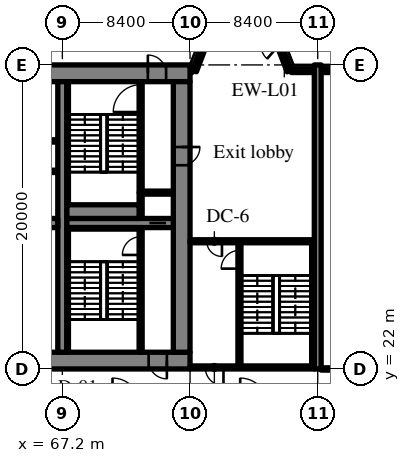
"""IFC4 building model, lengths in metres.
Left out: names, types, materials, properties, quantities, classifications, styles, units other than length and angle.
Written with IfcOpenShell. Run it as: python <this file> out.ifc"""

import sys

from ifc_helpers import new_model, si_unit, direction, frame, frame_2d, origin, place, context, subcontext, project, spatial, rectangle, extrude, source, transform, mapped, element, fill, save


model = new_model("IFC4")
c1 = context("Model", 3, precision=1e-05, world=origin(), true_north=direction((0.0, 1.0)))
c2 = subcontext(c1, "Body", "Model", "MODEL_VIEW")
j1 = project(units=[si_unit("LENGTHUNIT", "METRE"), si_unit("PLANEANGLEUNIT", "RADIAN")], contexts=[c1])
p1 = place(None, origin())
s1 = spatial("IfcSite", under=j1, at=p1, CompositionType="ELEMENT")
p2 = place(p1, origin())
s2 = spatial("IfcBuilding", under=s1, at=p2, CompositionType="ELEMENT")
p3 = place(p2, origin())
s3 = spatial("IfcBuildingStorey", under=s2, at=p3, CompositionType="ELEMENT", Elevation=0.0)
m1 = source(origin(), c2, "Body", "SweptSolid", [
    extrude(rectangle(XDim=50.4, YDim=1.1, at=frame_2d((25.2, 0.0))), origin(), (0.0, 0.0, 1.0), 5.72),
])
p4 = place(p3, frame((25.2, 22.55, 0.0), z_axis=(0.0, 0.0, 1.0), x_axis=(1.0, 0.0, 0.0)))
e1 = element("IfcWall", 1, at=p4, inside=s3, PredefinedType="SHEAR", context=c2, shape_type="MappedRepresentation", body=[
    mapped(m1, transform((0.0, 0.0, 0.0), scale=1.0)),
])
m2 = source(origin(), c2, "Body", "SweptSolid", [
    extrude(rectangle(XDim=1.8, YDim=2.1, at=frame_2d((0.9, 1.05))), frame((0.0, 0.56, 0.0), z_axis=(0.0, -1.0, 0.0), x_axis=(1.0, 0.0, 0.0)), (0.0, 0.0, 1.0), 1.12),
])
p5 = place(p4, frame((15.9, 0.0, 0.0)))
e2 = element("IfcOpeningElement", 2, at=p5, cuts=e1, PredefinedType="OPENING", context=c2, shape_type="MappedRepresentation", body=[
    mapped(m2, transform((0.0, 0.0, 0.0), scale=1.0)),
])
p6 = place(p4, frame((32.7, 0.0, 0.0)))
e3 = element("IfcOpeningElement", 3, at=p6, cuts=e1, PredefinedType="OPENING", context=c2, shape_type="MappedRepresentation", body=[
    mapped(m2, transform((0.0, 0.0, 0.0), scale=1.0)),
])
m3 = source(origin(), c2, "Body", "SweptSolid", [
    extrude(rectangle(XDim=0.9, YDim=2.1, at=frame_2d((0.45, 1.05))), frame((0.0, 0.56, 0.0), z_axis=(0.0, -1.0, 0.0), x_axis=(1.0, 0.0, 0.0)), (0.0, 0.0, 1.0), 1.12),
])
p7 = place(p4, frame((39.75, 0.0, 0.0)))
e4 = element("IfcOpeningElement", 4, at=p7, cuts=e1, PredefinedType="OPENING", context=c2, shape_type="MappedRepresentation", body=[
    mapped(m3, transform((0.0, 0.0, 0.0), scale=1.0)),
])
p8 = place(p4, frame((28.05, 0.0, 0.0)))
e5 = element("IfcOpeningElement", 5, at=p8, cuts=e1, PredefinedType="OPENING", context=c2, shape_type="MappedRepresentation", body=[
    mapped(m3, transform((0.0, 0.0, 0.0), scale=1.0)),
])
m4 = source(origin(), c2, "Body", "SweptSolid", [
    extrude(rectangle(XDim=1.2, YDim=2.1, at=frame_2d((0.6, 1.05))), frame((0.0, 0.56, 0.0), z_axis=(0.0, -1.0, 0.0), x_axis=(1.0, 0.0, 0.0)), (0.0, 0.0, 1.0), 1.12),
])
p9 = place(p4, frame((6.425, 0.0, 0.0)))
e6 = element("IfcOpeningElement", 6, at=p9, cuts=e1, PredefinedType="OPENING", context=c2, shape_type="MappedRepresentation", body=[
    mapped(m4, transform((0.0, 0.0, 0.0), scale=1.0)),
])
p10 = place(p4, frame((47.675, 0.0, 0.0)))
e7 = element("IfcOpeningElement", 7, at=p10, cuts=e1, PredefinedType="OPENING", context=c2, shape_type="MappedRepresentation", body=[
    mapped(m4, transform((0.0, 0.0, 0.0), scale=1.0)),
])
p11 = place(p3, frame((25.2, 41.45, 0.0), z_axis=(0.0, 0.0, 1.0), x_axis=(1.0, 0.0, 0.0)))
e8 = element("IfcWall", 8, at=p11, inside=s3, PredefinedType="SHEAR", context=c2, shape_type="MappedRepresentation", body=[
    mapped(m1, transform((0.0, 0.0, 0.0), scale=1.0)),
])
p12 = place(p11, frame((6.375, 0.0, 0.0)))
e9 = element("IfcOpeningElement", 9, at=p12, cuts=e8, PredefinedType="OPENING", context=c2, shape_type="MappedRepresentation", body=[
    mapped(m4, transform((0.0, 0.0, 0.0), scale=1.0)),
])
p13 = place(p11, frame((47.625, 0.0, 0.0)))
e10 = element("IfcOpeningElement", 10, at=p13, cuts=e8, PredefinedType="OPENING", context=c2, shape_type="MappedRepresentation", body=[
    mapped(m4, transform((0.0, 0.0, 0.0), scale=1.0)),
])
m5 = source(origin(), c2, "Body", "SweptSolid", [
    extrude(rectangle(XDim=17.8, YDim=1.1, at=frame_2d((8.9, 0.0))), origin(), (0.0, 0.0, 1.0), 5.72),
])
p14 = place(p3, frame((75.05, 23.1, 0.0), z_axis=(0.0, 0.0, 1.0), x_axis=(0.0, 1.0, 0.0)))
e11 = element("IfcWall", 11, at=p14, inside=s3, PredefinedType="SHEAR", context=c2, shape_type="MappedRepresentation", body=[
    mapped(m5, transform((0.0, 0.0, 0.0), scale=1.0)),
])
p15 = place(p14, frame((12.3, 0.0, 0.0)))
e12 = element("IfcOpeningElement", 12, at=p15, cuts=e11, PredefinedType="OPENING", context=c2, shape_type="MappedRepresentation", body=[
    mapped(m4, transform((0.0, 0.0, 0.0), scale=1.0)),
])
m6 = source(origin(), c2, "Body", "SweptSolid", [
    extrude(rectangle(XDim=17.8, YDim=0.6, at=frame_2d((8.9, 0.0))), origin(), (0.0, 0.0, 1.0), 5.72),
])
p16 = place(p3, frame((67.2, 23.1, 0.0), z_axis=(0.0, 0.0, 1.0), x_axis=(0.0, 1.0, 0.0)))
e13 = element("IfcWall", 13, at=p16, inside=s3, PredefinedType="SHEAR", context=c2, shape_type="MappedRepresentation", body=[
    mapped(m6, transform((0.0, 0.0, 0.0), scale=1.0)),
])
m7 = source(origin(), c2, "Body", "SweptSolid", [
    extrude(rectangle(XDim=16.2, YDim=0.6, at=frame_2d((8.1, 0.0))), origin(), (0.0, 0.0, 1.0), 5.72),
])
p17 = place(p3, frame((50.7, 31.6, 0.0), z_axis=(0.0, 0.0, 1.0), x_axis=(1.0, 0.0, 0.0)))
e14 = element("IfcWall", 14, at=p17, inside=s3, PredefinedType="SHEAR", context=c2, shape_type="MappedRepresentation", body=[
    mapped(m7, transform((0.0, 0.0, 0.0), scale=1.0)),
])
m8 = source(origin(), c2, "Body", "SweptSolid", [
    extrude(rectangle(XDim=1.0, YDim=2.1, at=frame_2d((0.5, 1.05))), frame((0.0, 0.31, 0.0), z_axis=(0.0, -1.0, 0.0), x_axis=(1.0, 0.0, 0.0)), (0.0, 0.0, 1.0), 0.62),
])
p18 = place(p17, frame((0.55, 0.0, 0.0)))
e15 = element("IfcOpeningElement", 15, at=p18, cuts=e14, PredefinedType="OPENING", context=c2, shape_type="MappedRepresentation", body=[
    mapped(m8, transform((0.0, 0.0, 0.0), scale=1.0)),
])
m9 = source(origin(), c2, "Body", "SweptSolid", [
    extrude(rectangle(XDim=7.0, YDim=0.6, at=frame_2d((3.5, 0.0))), origin(), (0.0, 0.0, 1.0), 5.72),
])
p19 = place(p3, frame((67.5, 31.6, 0.0), z_axis=(0.0, 0.0, 1.0), x_axis=(1.0, 0.0, 0.0)))
e16 = element("IfcWall", 16, at=p19, inside=s3, PredefinedType="SHEAR", context=c2, shape_type="MappedRepresentation", body=[
    mapped(m9, transform((0.0, 0.0, 0.0), scale=1.0)),
])
m10 = source(origin(), c2, "Body", "SweptSolid", [
    extrude(rectangle(XDim=1.1, YDim=2.1, at=frame_2d((0.55, 1.05))), frame((0.0, 0.31, 0.0), z_axis=(0.0, -1.0, 0.0), x_axis=(1.0, 0.0, 0.0)), (0.0, 0.0, 1.0), 0.62),
])
p20 = place(p19, frame((5.425, 0.0, 0.0)))
e17 = element("IfcOpeningElement", 17, at=p20, cuts=e16, PredefinedType="OPENING", context=c2, shape_type="MappedRepresentation", body=[
    mapped(m10, transform((0.0, 0.0, 0.0), scale=1.0)),
])
m11 = source(origin(), c2, "Body", "SweptSolid", [
    extrude(rectangle(XDim=20.0, YDim=0.45, at=frame_2d((10.0, 0.0))), origin(), (0.0, 0.0, 1.0), 5.72),
])
p21 = place(p3, frame((84.0, 22.0, 0.0), z_axis=(0.0, 0.0, 1.0), x_axis=(0.0, 1.0, 0.0)))
e18 = element("IfcWall", 18, at=p21, inside=s3, PredefinedType="SHEAR", context=c2, shape_type="MappedRepresentation", body=[
    mapped(m11, transform((0.0, 0.0, 0.0), scale=1.0)),
])
m12 = source(origin(), c2, "Body", "SweptSolid", [
    extrude(rectangle(XDim=1.812, YDim=0.3, at=frame_2d((0.906, 0.0))), origin(), (0.0, 0.0, 1.0), 5.72),
])
for number, where, z_axis, x_axis in (
    (19, (82.125, 41.6, 0.0), (0.0, 0.0, 1.0), (-0.358, 0.934, 0.0)),
    (20, (76.523, 43.292, 0.0), (0.0, 0.0, 1.0), (-0.358, -0.934, 0.0)),
):
    element("IfcWall", number, at=place(p3, frame(where, z_axis=z_axis, x_axis=x_axis)), inside=s3, PredefinedType="SOLIDWALL", context=c2, shape_type="MappedRepresentation", body=[
        mapped(m12, transform((0.0, 0.0, 0.0), scale=1.0)),
    ])
m13 = source(origin(), c2, "Body", "SweptSolid", [
    extrude(rectangle(XDim=0.138, YDim=0.25, at=frame_2d((0.069, 0.0))), origin(), (0.0, 0.0, 1.0), 4.97),
])
p22 = place(p3, frame((75.738, 41.625, 0.0), z_axis=(0.0, 0.0, 1.0), x_axis=(-1.0, 0.0, 0.0)))
e21 = element("IfcWall", 21, at=p22, inside=s3, PredefinedType="SOLIDWALL", context=c2, shape_type="MappedRepresentation", body=[
    mapped(m13, transform((0.0, 0.0, 0.0), scale=1.0)),
])
m14 = source(origin(), c2, "Body", "SweptSolid", [
    extrude(rectangle(XDim=3.525, YDim=0.25, at=frame_2d((1.762, 0.0))), origin(), (0.0, 0.0, 1.0), 4.97),
])
p23 = place(p3, frame((87.75, 41.625, 0.0), z_axis=(0.0, 0.0, 1.0), x_axis=(-1.0, 0.0, 0.0)))
e22 = element("IfcWall", 22, at=p23, inside=s3, PredefinedType="SOLIDWALL", context=c2, shape_type="MappedRepresentation", body=[
    mapped(m14, transform((0.0, 0.0, 0.0), scale=1.0)),
])
m15 = source(origin(), c2, "Body", "SweptSolid", [
    extrude(rectangle(XDim=1.5, YDim=1.5, at=frame_2d((0.75, 0.75))), frame((0.0, 0.135, 0.0), z_axis=(0.0, -1.0, 0.0), x_axis=(1.0, 0.0, 0.0)), (0.0, 0.0, 1.0), 0.27),
])
p24 = place(p23, frame((1.012, 0.0, 0.9)))
e23 = element("IfcOpeningElement", 23, at=p24, cuts=e22, PredefinedType="OPENING", context=c2, shape_type="MappedRepresentation", body=[
    mapped(m15, transform((0.0, 0.0, 0.0), scale=1.0)),
])
m16 = source(origin(), c2, "Body", "SweptSolid", [
    extrude(rectangle(XDim=1.513, YDim=0.25, at=frame_2d((0.756, 0.0))), origin(), (0.0, 0.0, 1.0), 4.97),
])
p25 = place(p3, frame((83.775, 41.625, 0.0), z_axis=(0.0, 0.0, 1.0), x_axis=(-1.0, 0.0, 0.0)))
e24 = element("IfcWall", 24, at=p25, inside=s3, PredefinedType="SOLIDWALL", context=c2, shape_type="MappedRepresentation", body=[
    mapped(m16, transform((0.0, 0.0, 0.0), scale=1.0)),
])
m17 = source(origin(), c2, "Body", "SweptSolid", [
    extrude(rectangle(XDim=14.1, YDim=0.15, at=frame_2d((7.05, 0.0))), origin(), (0.0, 0.0, 1.0), 5.72),
])
p26 = place(p3, frame((66.9, 35.0, 0.0), z_axis=(0.0, 0.0, 1.0), x_axis=(-1.0, 0.0, 0.0)))
e25 = element("IfcWall", 25, at=p26, inside=s3, PredefinedType="PARTITIONING", context=c2, shape_type="MappedRepresentation", body=[
    mapped(m17, transform((0.0, 0.0, 0.0), scale=1.0)),
])
m18 = source(origin(), c2, "Body", "SweptSolid", [
    extrude(rectangle(XDim=0.9, YDim=2.1, at=frame_2d((0.45, 1.05))), frame((0.0, 0.085, 0.0), z_axis=(0.0, -1.0, 0.0), x_axis=(1.0, 0.0, 0.0)), (0.0, 0.0, 1.0), 0.17),
])
p27 = place(p26, frame((3.407, 0.0, 0.0)))
e26 = element("IfcOpeningElement", 26, at=p27, cuts=e25, PredefinedType="OPENING", context=c2, shape_type="MappedRepresentation", body=[
    mapped(m18, transform((0.0, 0.0, 0.0), scale=1.0)),
])
p28 = place(p26, frame((10.419, 0.0, 0.0)))
e27 = element("IfcOpeningElement", 27, at=p28, cuts=e25, PredefinedType="OPENING", context=c2, shape_type="MappedRepresentation", body=[
    mapped(m18, transform((0.0, 0.0, 0.0), scale=1.0)),
])
m19 = source(origin(), c2, "Body", "SweptSolid", [
    extrude(rectangle(XDim=16.2, YDim=0.15, at=frame_2d((8.1, 0.0))), origin(), (0.0, 0.0, 1.0), 5.72),
])
p29 = place(p3, frame((66.9, 37.0, 0.0), z_axis=(0.0, 0.0, 1.0), x_axis=(-1.0, 0.0, 0.0)))
e28 = element("IfcWall", 28, at=p29, inside=s3, PredefinedType="PARTITIONING", context=c2, shape_type="MappedRepresentation", body=[
    mapped(m19, transform((0.0, 0.0, 0.0), scale=1.0)),
])
p30 = place(p29, frame((6.435, 0.0, 0.0)))
e29 = element("IfcOpeningElement", 29, at=p30, cuts=e28, PredefinedType="OPENING", context=c2, shape_type="MappedRepresentation", body=[
    mapped(m18, transform((0.0, 0.0, 0.0), scale=1.0)),
])
p31 = place(p29, frame((14.535, 0.0, 0.0)))
e30 = element("IfcOpeningElement", 30, at=p31, cuts=e28, PredefinedType="OPENING", context=c2, shape_type="MappedRepresentation", body=[
    mapped(m18, transform((0.0, 0.0, 0.0), scale=1.0)),
])
m20 = source(origin(), c2, "Body", "SweptSolid", [
    extrude(rectangle(XDim=8.2, YDim=0.2, at=frame_2d((4.1, 0.0))), origin(), (0.0, 0.0, 1.0), 5.72),
])
p32 = place(p3, frame((72.35, 23.1, 0.0), z_axis=(0.0, 0.0, 1.0), x_axis=(0.0, 1.0, 0.0)))
e31 = element("IfcWall", 31, at=p32, inside=s3, PredefinedType="SOLIDWALL", context=c2, shape_type="MappedRepresentation", body=[
    mapped(m20, transform((0.0, 0.0, 0.0), scale=1.0)),
])
m21 = source(origin(), c2, "Body", "SweptSolid", [
    extrude(rectangle(XDim=1.2, YDim=2.1, at=frame_2d((0.6, 1.05))), frame((0.0, 0.11, 0.0), z_axis=(0.0, -1.0, 0.0), x_axis=(1.0, 0.0, 0.0)), (0.0, 0.0, 1.0), 0.22),
])
p33 = place(p32, frame((6.4, 0.0, 0.0)))
e32 = element("IfcOpeningElement", 32, at=p33, cuts=e31, PredefinedType="OPENING", context=c2, shape_type="MappedRepresentation", body=[
    mapped(m21, transform((0.0, 0.0, 0.0), scale=1.0)),
])
m22 = source(origin(), c2, "Body", "SweptSolid", [
    extrude(rectangle(XDim=1.7, YDim=0.2, at=frame_2d((0.85, 0.0))), origin(), (0.0, 0.0, 1.0), 5.72),
])
p34 = place(p3, frame((72.35, 31.9, 0.0), z_axis=(0.0, 0.0, 1.0), x_axis=(0.0, 1.0, 0.0)))
e33 = element("IfcWall", 33, at=p34, inside=s3, PredefinedType="SOLIDWALL", context=c2, shape_type="MappedRepresentation", body=[
    mapped(m22, transform((0.0, 0.0, 0.0), scale=1.0)),
])
m23 = source(origin(), c2, "Body", "SweptSolid", [
    extrude(rectangle(XDim=2.05, YDim=0.2, at=frame_2d((1.025, 0.0))), origin(), (0.0, 0.0, 1.0), 5.72),
])
p35 = place(p3, frame((72.45, 33.6, 0.0), z_axis=(0.0, 0.0, 1.0), x_axis=(1.0, 0.0, 0.0)))
e34 = element("IfcWall", 34, at=p35, inside=s3, PredefinedType="SOLIDWALL", context=c2, shape_type="MappedRepresentation", body=[
    mapped(m23, transform((0.0, 0.0, 0.0), scale=1.0)),
])
m24 = source(origin(), c2, "Body", "SweptSolid", [
    extrude(rectangle(XDim=7.3, YDim=0.2, at=frame_2d((3.65, 0.0))), origin(), (0.0, 0.0, 1.0), 5.72),
])
p36 = place(p3, frame((72.35, 33.6, 0.0), z_axis=(0.0, 0.0, 1.0), x_axis=(0.0, 1.0, 0.0)))
e35 = element("IfcWall", 35, at=p36, inside=s3, PredefinedType="SOLIDWALL", context=c2, shape_type="MappedRepresentation", body=[
    mapped(m24, transform((0.0, 0.0, 0.0), scale=1.0)),
])
m25 = source(origin(), c2, "Body", "SweptSolid", [
    extrude(rectangle(XDim=1.8, YDim=2.1, at=frame_2d((0.9, 1.05))), frame((0.0, 0.11, 0.0), z_axis=(0.0, -1.0, 0.0), x_axis=(1.0, 0.0, 0.0)), (0.0, 0.0, 1.0), 0.22),
])
p37 = place(p36, frame((5.3, 0.0, 0.0)))
e36 = element("IfcOpeningElement", 36, at=p37, cuts=e35, PredefinedType="OPENING", context=c2, shape_type="MappedRepresentation", body=[
    mapped(m25, transform((0.0, 0.0, 0.0), scale=1.0)),
])
m26 = source(origin(), c2, "Body", "SweptSolid", [
    extrude(rectangle(XDim=8.3, YDim=0.2, at=frame_2d((4.15, 0.0))), origin(), (0.0, 0.0, 1.0), 5.72),
])
p38 = place(p3, frame((78.85, 22.1, 0.0), z_axis=(0.0, 0.0, 1.0), x_axis=(0.0, 1.0, 0.0)))
e37 = element("IfcWall", 37, at=p38, inside=s3, PredefinedType="SOLIDWALL", context=c2, shape_type="MappedRepresentation", body=[
    mapped(m26, transform((0.0, 0.0, 0.0), scale=1.0)),
])
p39 = place(p38, frame((6.5, 0.0, 0.0)))
e38 = element("IfcOpeningElement", 38, at=p39, cuts=e37, PredefinedType="OPENING", context=c2, shape_type="MappedRepresentation", body=[
    mapped(m21, transform((0.0, 0.0, 0.0), scale=1.0)),
])
m27 = source(origin(), c2, "Body", "SweptSolid", [
    extrude(rectangle(XDim=8.175, YDim=0.2, at=frame_2d((4.087, 0.0))), origin(), (0.0, 0.0, 1.0), 5.72),
])
p40 = place(p3, frame((83.775, 22.1, 0.0), z_axis=(0.0, 0.0, 1.0), x_axis=(-1.0, 0.0, 0.0)))
e39 = element("IfcWall", 39, at=p40, inside=s3, PredefinedType="SOLIDWALL", context=c2, shape_type="MappedRepresentation", body=[
    mapped(m27, transform((0.0, 0.0, 0.0), scale=1.0)),
])
p41 = place(p40, frame((5.975, 0.0, 0.0)))
e40 = element("IfcOpeningElement", 40, at=p41, cuts=e39, PredefinedType="OPENING", context=c2, shape_type="MappedRepresentation", body=[
    mapped(m21, transform((0.0, 0.0, 0.0), scale=1.0)),
])
p42 = place(p3, frame((83.775, 30.4, 0.0), z_axis=(0.0, 0.0, 1.0), x_axis=(-1.0, 0.0, 0.0)))
e41 = element("IfcWall", 41, at=p42, inside=s3, PredefinedType="SOLIDWALL", context=c2, shape_type="MappedRepresentation", body=[
    mapped(m27, transform((0.0, 0.0, 0.0), scale=1.0)),
])
m28 = source(origin(), c2, "Body", "SweptSolid", [
    extrude(rectangle(XDim=1.0, YDim=2.1, at=frame_2d((0.5, 1.05))), frame((0.0, 0.11, 0.0), z_axis=(0.0, -1.0, 0.0), x_axis=(1.0, 0.0, 0.0)), (0.0, 0.0, 1.0), 0.22),
])
p43 = place(p42, frame((6.075, 0.0, 0.0)))
e42 = element("IfcOpeningElement", 42, at=p43, cuts=e41, PredefinedType="OPENING", context=c2, shape_type="MappedRepresentation", body=[
    mapped(m28, transform((0.0, 0.0, 0.0), scale=1.0)),
])
m29 = source(origin(), c2, "Body", "SweptSolid", [
    extrude(rectangle(XDim=4.75, YDim=0.1, at=frame_2d((2.375, 0.0))), origin(), (0.0, 0.0, 1.0), 5.72),
])
p44 = place(p3, frame((67.5, 31.25, 0.0), z_axis=(0.0, 0.0, 1.0), x_axis=(1.0, 0.0, 0.0)))
e43 = element("IfcWall", 43, at=p44, inside=s3, PredefinedType="SOLIDWALL", context=c2, shape_type="MappedRepresentation", body=[
    mapped(m29, transform((0.0, 0.0, 0.0), scale=1.0)),
])
m30 = source(origin(), c2, "Body", "SweptSolid", [
    extrude(rectangle(XDim=8.1, YDim=0.1, at=frame_2d((4.05, 0.0))), origin(), (0.0, 0.0, 1.0), 5.72),
])
p45 = place(p3, frame((67.55, 23.1, 0.0), z_axis=(0.0, 0.0, 1.0), x_axis=(0.0, 1.0, 0.0)))
e44 = element("IfcWall", 44, at=p45, inside=s3, PredefinedType="SOLIDWALL", context=c2, shape_type="MappedRepresentation", body=[
    mapped(m30, transform((0.0, 0.0, 0.0), scale=1.0)),
])
m31 = source(origin(), c2, "Body", "SweptSolid", [
    extrude(rectangle(XDim=4.75, YDim=0.9, at=frame_2d((2.375, 0.0))), origin(), (0.0, 0.0, 1.0), 5.72),
])
p46 = place(p3, frame((67.5, 32.35, 0.0), z_axis=(0.0, 0.0, 1.0), x_axis=(1.0, 0.0, 0.0)))
e45 = element("IfcWall", 45, at=p46, inside=s3, PredefinedType="SOLIDWALL", context=c2, shape_type="MappedRepresentation", body=[
    mapped(m31, transform((0.0, 0.0, 0.0), scale=1.0)),
])
p47 = place(p3, frame((67.55, 32.8, 0.0), z_axis=(0.0, 0.0, 1.0), x_axis=(0.0, 1.0, 0.0)))
e46 = element("IfcWall", 46, at=p47, inside=s3, PredefinedType="SOLIDWALL", context=c2, shape_type="MappedRepresentation", body=[
    mapped(m30, transform((0.0, 0.0, 0.0), scale=1.0)),
])
m32 = source(origin(), c2, "Body", "SweptSolid", [
    extrude(rectangle(XDim=8.1, YDim=0.175, at=frame_2d((4.05, 0.0))), origin(), (0.0, 0.0, 1.0), 5.72),
])
p48 = place(p3, frame((83.688, 22.2, 0.0), z_axis=(0.0, 0.0, 1.0), x_axis=(0.0, 1.0, 0.0)))
e47 = element("IfcWall", 47, at=p48, inside=s3, PredefinedType="SOLIDWALL", context=c2, shape_type="MappedRepresentation", body=[
    mapped(m32, transform((0.0, 0.0, 0.0), scale=1.0)),
])
m33 = source(origin(), c2, "Body", "SweptSolid", [
    extrude(rectangle(XDim=7.95, YDim=0.15, at=frame_2d((3.975, 0.0))), origin(), (0.0, 0.0, 1.0), 5.02),
])
p49 = place(p3, frame((84.225, 22.0, 0.0), z_axis=(0.0, 0.0, 1.0), x_axis=(1.0, 0.0, 0.0)))
e48 = element("IfcWall", 48, at=p49, inside=s3, PredefinedType="PARTITIONING", context=c2, shape_type="MappedRepresentation", body=[
    mapped(m33, transform((0.0, 0.0, 0.0), scale=1.0)),
])
m34 = source(origin(), c2, "Body", "SweptSolid", [
    extrude(rectangle(XDim=1.8, YDim=2.1, at=frame_2d((0.9, 1.05))), frame((0.0, 0.085, 0.0), z_axis=(0.0, -1.0, 0.0), x_axis=(1.0, 0.0, 0.0)), (0.0, 0.0, 1.0), 0.17),
])
p50 = place(p49, frame((3.075, 0.0, 0.0)))
e49 = element("IfcOpeningElement", 49, at=p50, cuts=e48, PredefinedType="OPENING", context=c2, shape_type="MappedRepresentation", body=[
    mapped(m34, transform((0.0, 0.0, 0.0), scale=1.0)),
])
m35 = source(origin(), c2, "Body", "SweptSolid", [
    extrude(rectangle(XDim=1.2, YDim=2.1, at=frame_2d((0.6, 1.05))), frame((0.0, 0.025, 0.0), z_axis=(0.0, -1.0, 0.0), x_axis=(1.0, 0.0, 0.0)), (0.0, 0.0, 1.0), 0.05),
])
p51 = place(p33, origin())
e50 = element("IfcDoor", 50, at=p51, inside=s3, OperationType="SINGLE_SWING_LEFT", PredefinedType="DOOR", context=c2, shape_type="MappedRepresentation", body=[
    mapped(m35, transform((0.0, 0.0, 0.0), scale=1.0)),
])
fill(e32, e50)
m36 = source(origin(), c2, "Body", "SweptSolid", [
    extrude(rectangle(XDim=1.2, YDim=2.1, at=frame_2d((0.6, 1.05))), frame((0.0, 0.325, 0.0), z_axis=(0.0, -1.0, 0.0), x_axis=(1.0, 0.0, 0.0)), (0.0, 0.0, 1.0), 0.05),
])
p52 = place(p10, origin())
e51 = element("IfcDoor", 51, at=p52, inside=s3, OperationType="SINGLE_SWING_RIGHT", PredefinedType="DOOR", context=c2, shape_type="MappedRepresentation", body=[
    mapped(m36, transform((0.0, 0.0, 0.0), scale=1.0)),
])
fill(e7, e51)
m37 = source(origin(), c2, "Body", "SweptSolid", [
    extrude(rectangle(XDim=1.1, YDim=2.1, at=frame_2d((0.55, 1.05))), frame((0.0, 0.025, 0.0), z_axis=(0.0, -1.0, 0.0), x_axis=(1.0, 0.0, 0.0)), (0.0, 0.0, 1.0), 0.05),
])
p53 = place(p20, origin())
e52 = element("IfcDoor", 52, at=p53, inside=s3, OperationType="SLIDING_TO_RIGHT", PredefinedType="DOOR", context=c2, shape_type="MappedRepresentation", body=[
    mapped(m37, transform((0.0, 0.0, 0.0), scale=1.0)),
])
fill(e17, e52)
m38 = source(origin(), c2, "Body", "SweptSolid", [
    extrude(rectangle(XDim=1.8, YDim=2.1, at=frame_2d((0.9, 1.05))), frame((0.0, 0.025, 0.0), z_axis=(0.0, -1.0, 0.0), x_axis=(1.0, 0.0, 0.0)), (0.0, 0.0, 1.0), 0.05),
])
p54 = place(p37, origin())
e53 = element("IfcDoor", 53, at=p54, inside=s3, OperationType="SINGLE_SWING_LEFT", PredefinedType="DOOR", context=c2, shape_type="MappedRepresentation", body=[
    mapped(m38, transform((0.0, 0.0, 0.0), scale=1.0)),
])
fill(e36, e53)
p55 = place(p15, origin())
e54 = element("IfcDoor", 54, at=p55, inside=s3, OperationType="SINGLE_SWING_RIGHT", PredefinedType="DOOR", context=c2, shape_type="MappedRepresentation", body=[
    mapped(m35, transform((0.0, 0.0, 0.0), scale=1.0)),
])
fill(e12, e54)
p56 = place(p13, origin())
e55 = element("IfcDoor", 55, at=p56, inside=s3, OperationType="SINGLE_SWING_LEFT", PredefinedType="DOOR", context=c2, shape_type="MappedRepresentation", body=[
    mapped(m35, transform((0.0, 0.0, 0.0), scale=1.0)),
])
fill(e10, e55)
p57 = place(p39, origin())
e56 = element("IfcDoor", 56, at=p57, inside=s3, OperationType="SINGLE_SWING_LEFT", PredefinedType="DOOR", context=c2, shape_type="MappedRepresentation", body=[
    mapped(m35, transform((0.0, 0.0, 0.0), scale=1.0)),
])
fill(e38, e56)
p58 = place(p41, origin())
e57 = element("IfcDoor", 57, at=p58, inside=s3, OperationType="SINGLE_SWING_LEFT", PredefinedType="DOOR", context=c2, shape_type="MappedRepresentation", body=[
    mapped(m35, transform((0.0, 0.0, 0.0), scale=1.0)),
])
fill(e40, e57)
m39 = source(origin(), c2, "Body", "SweptSolid", [
    extrude(rectangle(XDim=1.0, YDim=2.1, at=frame_2d((0.5, 1.05))), frame((0.0, 0.025, 0.0), z_axis=(0.0, -1.0, 0.0), x_axis=(1.0, 0.0, 0.0)), (0.0, 0.0, 1.0), 0.05),
])
p59 = place(p43, origin())
e58 = element("IfcDoor", 58, at=p59, inside=s3, OperationType="SINGLE_SWING_LEFT", PredefinedType="DOOR", context=c2, shape_type="MappedRepresentation", body=[
    mapped(m39, transform((0.0, 0.0, 0.0), scale=1.0)),
])
fill(e42, e58)
save(model, sys.argv[1])
